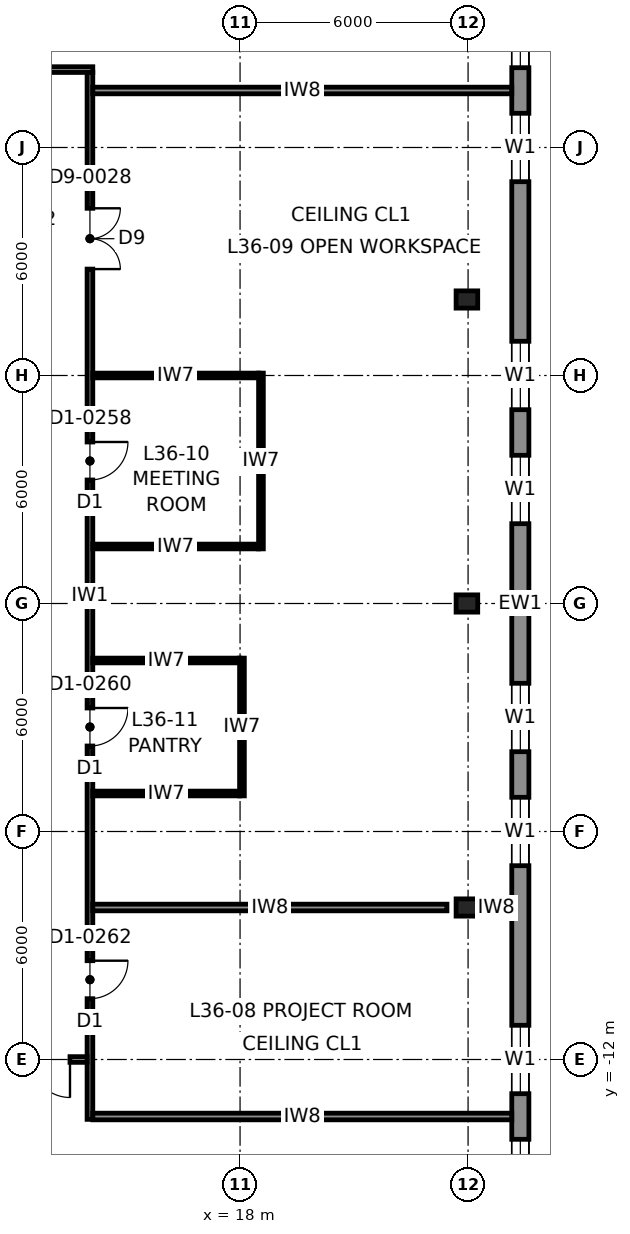
"""IFC4 building model, lengths in metres.
Left out: names, types, materials, properties, quantities, classifications, styles, units other than length and angle.
Written with IfcOpenShell. Run it as: python <this file> out.ifc"""

import sys

from ifc_helpers import new_model, si_unit, direction, frame, frame_2d, origin, origin_2d, place, context, subcontext, project, spatial, rectangle, i_section, extrude, element, fill, save


model = new_model("IFC4")
c1 = context("Model", 3, precision=1e-05, world=origin(), true_north=direction((0.0, 1.0)))
c2 = subcontext(c1, "Body", "Model", "MODEL_VIEW")
j1 = project(units=[si_unit("LENGTHUNIT", "METRE"), si_unit("PLANEANGLEUNIT", "RADIAN")], contexts=[c1])
p1 = place(None, origin())
s1 = spatial("IfcSite", under=j1, at=p1, CompositionType="ELEMENT")
p2 = place(p1, origin())
s2 = spatial("IfcBuilding", under=s1, at=p2, CompositionType="ELEMENT")
p3 = place(p2, frame((0.0, 0.0, 171.8)))
s3 = spatial("IfcBuildingStorey", under=s2, at=p3, CompositionType="ELEMENT", Elevation=171.8)
for number, where, z_axis, x_axis in (
    (1, (23.969, 0.0, 0.0), (-0.04, 0.0, 0.999), (0.0, -1.0, 0.0)),
    (2, (23.969, -8.0, 0.0), (-0.04, 0.0, 0.999), (0.0, -1.0, 0.0)),
    (3, (23.969, 8.0, 0.0), (-0.04, 0.0, 0.999), (0.0, -1.0, 0.0)),
):
    element("IfcColumn", number, at=place(p3, frame(where, z_axis=z_axis, x_axis=x_axis)), inside=s3, PredefinedType="COLUMN", context=c2, shape_type="SweptSolid", body=[
        extrude(i_section(OverallWidth=0.454, OverallDepth=0.569, WebThickness=0.078, FlangeThickness=0.125, at=origin_2d()), origin(), (0.0, 0.0, 1.0), 4.003),
    ])
p4 = place(p3, frame((25.375, -21.1, 0.0), z_axis=(0.0, 0.0, 1.0), x_axis=(0.0, 1.0, 0.0)))
e4 = element("IfcWall", 4, at=p4, inside=s3, PredefinedType="SOLIDWALL", context=c2, shape_type="SweptSolid", body=[
    extrude(rectangle(XDim=42.2, YDim=0.45, at=frame_2d((21.1, 0.0))), origin(), (0.0, 0.0, 1.0), 3.83),
])
p5 = place(p4, frame((5.2, 0.0, 0.7)))
e5 = element("IfcOpeningElement", 5, at=p5, cuts=e4, PredefinedType="OPENING", context=c2, shape_type="SweptSolid", body=[
    extrude(rectangle(XDim=1.8, YDim=2.6, at=frame_2d((0.9, 1.3))), frame((0.0, 0.235, 0.0), z_axis=(0.0, -1.0, 0.0), x_axis=(1.0, 0.0, 0.0)), (0.0, 0.0, 1.0), 0.47),
])
p6 = place(p4, frame((8.2, 0.0, 0.7)))
e6 = element("IfcOpeningElement", 6, at=p6, cuts=e4, PredefinedType="OPENING", context=c2, shape_type="SweptSolid", body=[
    extrude(rectangle(XDim=1.8, YDim=2.6, at=frame_2d((0.9, 1.3))), frame((0.0, 0.235, 0.0), z_axis=(0.0, -1.0, 0.0), x_axis=(1.0, 0.0, 0.0)), (0.0, 0.0, 1.0), 0.47),
])
p7 = place(p4, frame((14.2, 0.0, 0.7)))
e7 = element("IfcOpeningElement", 7, at=p7, cuts=e4, PredefinedType="OPENING", context=c2, shape_type="SweptSolid", body=[
    extrude(rectangle(XDim=1.8, YDim=2.6, at=frame_2d((0.9, 1.3))), frame((0.0, 0.235, 0.0), z_axis=(0.0, -1.0, 0.0), x_axis=(1.0, 0.0, 0.0)), (0.0, 0.0, 1.0), 0.47),
])
p8 = place(p4, frame((17.2, 0.0, 0.7)))
e8 = element("IfcOpeningElement", 8, at=p8, cuts=e4, PredefinedType="OPENING", context=c2, shape_type="SweptSolid", body=[
    extrude(rectangle(XDim=1.8, YDim=2.6, at=frame_2d((0.9, 1.3))), frame((0.0, 0.235, 0.0), z_axis=(0.0, -1.0, 0.0), x_axis=(1.0, 0.0, 0.0)), (0.0, 0.0, 1.0), 0.47),
])
p9 = place(p4, frame((23.2, 0.0, 0.7)))
e9 = element("IfcOpeningElement", 9, at=p9, cuts=e4, PredefinedType="OPENING", context=c2, shape_type="SweptSolid", body=[
    extrude(rectangle(XDim=1.8, YDim=2.6, at=frame_2d((0.9, 1.3))), frame((0.0, 0.235, 0.0), z_axis=(0.0, -1.0, 0.0), x_axis=(1.0, 0.0, 0.0)), (0.0, 0.0, 1.0), 0.47),
])
p10 = place(p4, frame((26.2, 0.0, 0.7)))
e10 = element("IfcOpeningElement", 10, at=p10, cuts=e4, PredefinedType="OPENING", context=c2, shape_type="SweptSolid", body=[
    extrude(rectangle(XDim=1.8, YDim=2.6, at=frame_2d((0.9, 1.3))), frame((0.0, 0.235, 0.0), z_axis=(0.0, -1.0, 0.0), x_axis=(1.0, 0.0, 0.0)), (0.0, 0.0, 1.0), 0.47),
])
p11 = place(p4, frame((32.2, 0.0, 0.7)))
e11 = element("IfcOpeningElement", 11, at=p11, cuts=e4, PredefinedType="OPENING", context=c2, shape_type="SweptSolid", body=[
    extrude(rectangle(XDim=1.8, YDim=2.6, at=frame_2d((0.9, 1.3))), frame((0.0, 0.235, 0.0), z_axis=(0.0, -1.0, 0.0), x_axis=(1.0, 0.0, 0.0)), (0.0, 0.0, 1.0), 0.47),
])
p12 = place(p4, frame((35.2, 0.0, 0.7)))
e12 = element("IfcOpeningElement", 12, at=p12, cuts=e4, PredefinedType="OPENING", context=c2, shape_type="SweptSolid", body=[
    extrude(rectangle(XDim=1.8, YDim=2.6, at=frame_2d((0.9, 1.3))), frame((0.0, 0.235, 0.0), z_axis=(0.0, -1.0, 0.0), x_axis=(1.0, 0.0, 0.0)), (0.0, 0.0, 1.0), 0.47),
])
p13 = place(p3, frame((-14.125, 14.05, 0.0), z_axis=(0.0, 0.0, 1.0), x_axis=(1.0, 0.0, 0.0)))
e13 = element("IfcWall", 13, at=p13, inside=s3, PredefinedType="PARTITIONING", context=c2, shape_type="SweptSolid", body=[
    extrude(rectangle(XDim=28.25, YDim=0.15, at=frame_2d((14.125, 0.0))), origin(), (0.0, 0.0, 1.0), 3.83),
])
p14 = place(p13, frame((2.425, 0.0, 0.0)))
e14 = element("IfcOpeningElement", 14, at=p14, cuts=e13, PredefinedType="OPENING", context=c2, shape_type="SweptSolid", body=[
    extrude(rectangle(XDim=1.6, YDim=2.3, at=frame_2d((0.8, 1.15))), frame((0.0, 0.085, 0.0), z_axis=(0.0, -1.0, 0.0), x_axis=(1.0, 0.0, 0.0)), (0.0, 0.0, 1.0), 0.17),
])
p15 = place(p13, frame((13.625, 0.0, 0.0)))
e15 = element("IfcOpeningElement", 15, at=p15, cuts=e13, PredefinedType="OPENING", context=c2, shape_type="SweptSolid", body=[
    extrude(rectangle(XDim=1.0, YDim=2.3, at=frame_2d((0.5, 1.15))), frame((0.0, 0.085, 0.0), z_axis=(0.0, -1.0, 0.0), x_axis=(1.0, 0.0, 0.0)), (0.0, 0.0, 1.0), 0.17),
])
p16 = place(p13, frame((24.225, 0.0, 0.0)))
e16 = element("IfcOpeningElement", 16, at=p16, cuts=e13, PredefinedType="OPENING", context=c2, shape_type="SweptSolid", body=[
    extrude(rectangle(XDim=1.6, YDim=2.3, at=frame_2d((0.8, 1.15))), frame((0.0, 0.085, 0.0), z_axis=(0.0, -1.0, 0.0), x_axis=(1.0, 0.0, 0.0)), (0.0, 0.0, 1.0), 0.17),
])
p17 = place(p13, frame((8.625, 0.0, 0.0)))
e17 = element("IfcOpeningElement", 17, at=p17, cuts=e13, PredefinedType="OPENING", context=c2, shape_type="SweptSolid", body=[
    extrude(rectangle(XDim=1.0, YDim=2.3, at=frame_2d((0.5, 1.15))), frame((0.0, 0.085, 0.0), z_axis=(0.0, -1.0, 0.0), x_axis=(1.0, 0.0, 0.0)), (0.0, 0.0, 1.0), 0.17),
])
p18 = place(p13, frame((18.625, 0.0, 0.0)))
e18 = element("IfcOpeningElement", 18, at=p18, cuts=e13, PredefinedType="OPENING", context=c2, shape_type="SweptSolid", body=[
    extrude(rectangle(XDim=1.0, YDim=2.3, at=frame_2d((0.5, 1.15))), frame((0.0, 0.085, 0.0), z_axis=(0.0, -1.0, 0.0), x_axis=(1.0, 0.0, 0.0)), (0.0, 0.0, 1.0), 0.17),
])
p19 = place(p3, frame((14.05, -13.575, 0.0), z_axis=(0.0, 0.0, 1.0), x_axis=(0.0, 1.0, 0.0)))
e19 = element("IfcWall", 19, at=p19, inside=s3, PredefinedType="PARTITIONING", context=c2, shape_type="SweptSolid", body=[
    extrude(rectangle(XDim=27.55, YDim=0.15, at=frame_2d((13.775, 0.0))), origin(), (0.0, 0.0, 1.0), 3.83),
])
p20 = place(p19, frame((3.175, 0.0, 0.0)))
e20 = element("IfcOpeningElement", 20, at=p20, cuts=e19, PredefinedType="OPENING", context=c2, shape_type="SweptSolid", body=[
    extrude(rectangle(XDim=1.0, YDim=2.3, at=frame_2d((0.5, 1.15))), frame((0.0, 0.085, 0.0), z_axis=(0.0, -1.0, 0.0), x_axis=(1.0, 0.0, 0.0)), (0.0, 0.0, 1.0), 0.17),
])
p21 = place(p19, frame((22.375, 0.0, 0.0)))
e21 = element("IfcOpeningElement", 21, at=p21, cuts=e19, PredefinedType="OPENING", context=c2, shape_type="SweptSolid", body=[
    extrude(rectangle(XDim=1.6, YDim=2.3, at=frame_2d((0.8, 1.15))), frame((0.0, 0.085, 0.0), z_axis=(0.0, -1.0, 0.0), x_axis=(1.0, 0.0, 0.0)), (0.0, 0.0, 1.0), 0.17),
])
p22 = place(p19, frame((16.825, 0.0, 0.0)))
e22 = element("IfcOpeningElement", 22, at=p22, cuts=e19, PredefinedType="OPENING", context=c2, shape_type="SweptSolid", body=[
    extrude(rectangle(XDim=1.0, YDim=2.3, at=frame_2d((0.5, 1.15))), frame((0.0, 0.085, 0.0), z_axis=(0.0, -1.0, 0.0), x_axis=(1.0, 0.0, 0.0)), (0.0, 0.0, 1.0), 0.17),
])
p23 = place(p19, frame((9.825, 0.0, 0.0)))
e23 = element("IfcOpeningElement", 23, at=p23, cuts=e19, PredefinedType="OPENING", context=c2, shape_type="SweptSolid", body=[
    extrude(rectangle(XDim=1.0, YDim=2.3, at=frame_2d((0.5, 1.15))), frame((0.0, 0.085, 0.0), z_axis=(0.0, -1.0, 0.0), x_axis=(1.0, 0.0, 0.0)), (0.0, 0.0, 1.0), 0.17),
])
p24 = place(p3, frame((13.975, -12.0, 0.0), z_axis=(0.0, 0.0, 1.0), x_axis=(-1.0, 0.0, 0.0)))
e24 = element("IfcWall", 24, at=p24, inside=s3, PredefinedType="PARTITIONING", context=c2, shape_type="SweptSolid", body=[
    extrude(rectangle(XDim=1.975, YDim=0.15, at=frame_2d((0.988, 0.0))), origin(), (0.0, 0.0, 1.0), 3.83),
])
p25 = place(p24, frame((0.45, 0.0, 0.0)))
e25 = element("IfcOpeningElement", 25, at=p25, cuts=e24, PredefinedType="OPENING", context=c2, shape_type="SweptSolid", body=[
    extrude(rectangle(XDim=1.0, YDim=2.3, at=frame_2d((0.5, 1.15))), frame((0.0, 0.085, 0.0), z_axis=(0.0, -1.0, 0.0), x_axis=(1.0, 0.0, 0.0)), (0.0, 0.0, 1.0), 0.17),
])
for number, where, z_axis, x_axis in (
    (26, (14.125, 13.5, 0.0), (0.0, 0.0, 1.0), (1.0, 0.0, 0.0)),
    (27, (25.15, -13.5, 0.0), (0.0, 0.0, 1.0), (-1.0, 0.0, 0.0)),
):
    element("IfcWall", number, at=place(p3, frame(where, z_axis=z_axis, x_axis=x_axis)), inside=s3, PredefinedType="PARTITIONING", context=c2, shape_type="SweptSolid", body=[
        extrude(rectangle(XDim=11.025, YDim=0.175, at=frame_2d((5.512, 0.0))), origin(), (0.0, 0.0, 1.0), 3.83),
    ])
p26 = place(p3, frame((14.125, -8.0, 0.0), z_axis=(0.0, 0.0, 1.0), x_axis=(1.0, 0.0, 0.0)))
e28 = element("IfcWall", 28, at=p26, inside=s3, PredefinedType="PARTITIONING", context=c2, shape_type="SweptSolid", body=[
    extrude(rectangle(XDim=9.319, YDim=0.175, at=frame_2d((4.66, 0.0))), origin(), (0.0, 0.0, 1.0), 2.84),
])
p27 = place(p3, frame((24.333, -8.0, 0.0), z_axis=(0.0, 0.0, 1.0), x_axis=(1.0, 0.0, 0.0)))
e29 = element("IfcWall", 29, at=p27, inside=s3, PredefinedType="PARTITIONING", context=c2, shape_type="SweptSolid", body=[
    extrude(rectangle(XDim=0.817, YDim=0.175, at=frame_2d((0.408, 0.0))), origin(), (0.0, 0.0, 1.0), 3.83),
])
p28 = place(p3, frame((18.55, 1.438, 0.0), z_axis=(0.0, 0.0, 1.0), x_axis=(0.0, 1.0, 0.0)))
e30 = element("IfcWall", 30, at=p28, inside=s3, PredefinedType="PARTITIONING", context=c2, shape_type="SweptSolid", body=[
    extrude(rectangle(XDim=4.625, YDim=0.125, at=frame_2d((2.312, 0.0))), origin(), (0.0, 0.0, 1.0), 3.83),
])
for number, where, z_axis, x_axis in (
    (31, (14.125, 1.5, 0.0), (0.0, 0.0, 1.0), (1.0, 0.0, 0.0)),
    (32, (14.125, 6.0, 0.0), (0.0, 0.0, 1.0), (1.0, 0.0, 0.0)),
):
    element("IfcWall", number, at=place(p3, frame(where, z_axis=z_axis, x_axis=x_axis)), inside=s3, PredefinedType="PARTITIONING", context=c2, shape_type="SweptSolid", body=[
        extrude(rectangle(XDim=4.363, YDim=0.125, at=frame_2d((2.181, 0.0))), origin(), (0.0, 0.0, 1.0), 3.83),
    ])
p29 = place(p3, frame((18.05, -5.062, 0.0), z_axis=(0.0, 0.0, 1.0), x_axis=(0.0, 1.0, 0.0)))
e33 = element("IfcWall", 33, at=p29, inside=s3, PredefinedType="PARTITIONING", context=c2, shape_type="SweptSolid", body=[
    extrude(rectangle(XDim=3.625, YDim=0.125, at=frame_2d((1.812, 0.0))), origin(), (0.0, 0.0, 1.0), 3.83),
])
for number, where, z_axis, x_axis in (
    (34, (14.125, -5.0, 0.0), (0.0, 0.0, 1.0), (1.0, 0.0, 0.0)),
    (35, (14.125, -1.5, 0.0), (0.0, 0.0, 1.0), (1.0, 0.0, 0.0)),
):
    element("IfcWall", number, at=place(p3, frame(where, z_axis=z_axis, x_axis=x_axis)), inside=s3, PredefinedType="PARTITIONING", context=c2, shape_type="SweptSolid", body=[
        extrude(rectangle(XDim=3.863, YDim=0.125, at=frame_2d((1.931, 0.0))), origin(), (0.0, 0.0, 1.0), 3.83),
    ])
p30 = place(p5, origin())
e36 = element("IfcWindow", 36, at=p30, inside=s3, PartitioningType="SINGLE_PANEL", PredefinedType="WINDOW", context=c2, shape_type="SweptSolid", body=[
    extrude(rectangle(XDim=1.8, YDim=2.6, at=frame_2d((0.9, 1.3))), frame((0.0, 0.03, 0.0), z_axis=(0.0, -1.0, 0.0), x_axis=(1.0, 0.0, 0.0)), (0.0, 0.0, 1.0), 0.06),
])
fill(e5, e36)
p31 = place(p6, origin())
e37 = element("IfcWindow", 37, at=p31, inside=s3, PartitioningType="SINGLE_PANEL", PredefinedType="WINDOW", context=c2, shape_type="SweptSolid", body=[
    extrude(rectangle(XDim=1.8, YDim=2.6, at=frame_2d((0.9, 1.3))), frame((0.0, 0.03, 0.0), z_axis=(0.0, -1.0, 0.0), x_axis=(1.0, 0.0, 0.0)), (0.0, 0.0, 1.0), 0.06),
])
fill(e6, e37)
p32 = place(p7, origin())
e38 = element("IfcWindow", 38, at=p32, inside=s3, PartitioningType="SINGLE_PANEL", PredefinedType="WINDOW", context=c2, shape_type="SweptSolid", body=[
    extrude(rectangle(XDim=1.8, YDim=2.6, at=frame_2d((0.9, 1.3))), frame((0.0, 0.03, 0.0), z_axis=(0.0, -1.0, 0.0), x_axis=(1.0, 0.0, 0.0)), (0.0, 0.0, 1.0), 0.06),
])
fill(e7, e38)
p33 = place(p8, origin())
e39 = element("IfcWindow", 39, at=p33, inside=s3, PartitioningType="SINGLE_PANEL", PredefinedType="WINDOW", context=c2, shape_type="SweptSolid", body=[
    extrude(rectangle(XDim=1.8, YDim=2.6, at=frame_2d((0.9, 1.3))), frame((0.0, 0.03, 0.0), z_axis=(0.0, -1.0, 0.0), x_axis=(1.0, 0.0, 0.0)), (0.0, 0.0, 1.0), 0.06),
])
fill(e8, e39)
p34 = place(p9, origin())
e40 = element("IfcWindow", 40, at=p34, inside=s3, PartitioningType="SINGLE_PANEL", PredefinedType="WINDOW", context=c2, shape_type="SweptSolid", body=[
    extrude(rectangle(XDim=1.8, YDim=2.6, at=frame_2d((0.9, 1.3))), frame((0.0, 0.03, 0.0), z_axis=(0.0, -1.0, 0.0), x_axis=(1.0, 0.0, 0.0)), (0.0, 0.0, 1.0), 0.06),
])
fill(e9, e40)
p35 = place(p10, origin())
e41 = element("IfcWindow", 41, at=p35, inside=s3, PartitioningType="SINGLE_PANEL", PredefinedType="WINDOW", context=c2, shape_type="SweptSolid", body=[
    extrude(rectangle(XDim=1.8, YDim=2.6, at=frame_2d((0.9, 1.3))), frame((0.0, 0.03, 0.0), z_axis=(0.0, -1.0, 0.0), x_axis=(1.0, 0.0, 0.0)), (0.0, 0.0, 1.0), 0.06),
])
fill(e10, e41)
p36 = place(p11, origin())
e42 = element("IfcWindow", 42, at=p36, inside=s3, PartitioningType="SINGLE_PANEL", PredefinedType="WINDOW", context=c2, shape_type="SweptSolid", body=[
    extrude(rectangle(XDim=1.8, YDim=2.6, at=frame_2d((0.9, 1.3))), frame((0.0, 0.03, 0.0), z_axis=(0.0, -1.0, 0.0), x_axis=(1.0, 0.0, 0.0)), (0.0, 0.0, 1.0), 0.06),
])
fill(e11, e42)
p37 = place(p12, origin())
e43 = element("IfcWindow", 43, at=p37, inside=s3, PartitioningType="SINGLE_PANEL", PredefinedType="WINDOW", context=c2, shape_type="SweptSolid", body=[
    extrude(rectangle(XDim=1.8, YDim=2.6, at=frame_2d((0.9, 1.3))), frame((0.0, 0.03, 0.0), z_axis=(0.0, -1.0, 0.0), x_axis=(1.0, 0.0, 0.0)), (0.0, 0.0, 1.0), 0.06),
])
fill(e12, e43)
p38 = place(p25, origin())
e44 = element("IfcDoor", 44, at=p38, inside=s3, OperationType="SINGLE_SWING_LEFT", PredefinedType="DOOR", context=c2, shape_type="SweptSolid", body=[
    extrude(rectangle(XDim=1.0, YDim=2.3, at=frame_2d((0.5, 1.15))), frame((0.0, 0.025, 0.0), z_axis=(0.0, -1.0, 0.0), x_axis=(1.0, 0.0, 0.0)), (0.0, 0.0, 1.0), 0.05),
])
fill(e25, e44)
p39 = place(p20, frame((1.0, 0.0, 0.0), z_axis=(0.0, 0.0, 1.0), x_axis=(-1.0, 0.0, 0.0)))
e45 = element("IfcDoor", 45, at=p39, inside=s3, OperationType="SINGLE_SWING_LEFT", PredefinedType="DOOR", context=c2, shape_type="SweptSolid", body=[
    extrude(rectangle(XDim=1.0, YDim=2.3, at=frame_2d((0.5, 1.15))), frame((0.0, 0.025, 0.0), z_axis=(0.0, -1.0, 0.0), x_axis=(1.0, 0.0, 0.0)), (0.0, 0.0, 1.0), 0.05),
])
fill(e20, e45)
p40 = place(p21, frame((1.6, 0.0, 0.0), z_axis=(0.0, 0.0, 1.0), x_axis=(-1.0, 0.0, 0.0)))
e46 = element("IfcDoor", 46, at=p40, inside=s3, OperationType="DOUBLE_DOOR_SINGLE_SWING", PredefinedType="DOOR", context=c2, shape_type="SweptSolid", body=[
    extrude(rectangle(XDim=1.6, YDim=2.3, at=frame_2d((0.8, 1.15))), frame((0.0, 0.025, 0.0), z_axis=(0.0, -1.0, 0.0), x_axis=(1.0, 0.0, 0.0)), (0.0, 0.0, 1.0), 0.05),
])
fill(e21, e46)
p41 = place(p22, frame((1.0, 0.0, 0.0), z_axis=(0.0, 0.0, 1.0), x_axis=(-1.0, 0.0, 0.0)))
e47 = element("IfcDoor", 47, at=p41, inside=s3, OperationType="SINGLE_SWING_LEFT", PredefinedType="DOOR", context=c2, shape_type="SweptSolid", body=[
    extrude(rectangle(XDim=1.0, YDim=2.3, at=frame_2d((0.5, 1.15))), frame((0.0, 0.025, 0.0), z_axis=(0.0, -1.0, 0.0), x_axis=(1.0, 0.0, 0.0)), (0.0, 0.0, 1.0), 0.05),
])
fill(e22, e47)
p42 = place(p23, frame((1.0, 0.0, 0.0), z_axis=(0.0, 0.0, 1.0), x_axis=(-1.0, 0.0, 0.0)))
e48 = element("IfcDoor", 48, at=p42, inside=s3, OperationType="SINGLE_SWING_LEFT", PredefinedType="DOOR", context=c2, shape_type="SweptSolid", body=[
    extrude(rectangle(XDim=1.0, YDim=2.3, at=frame_2d((0.5, 1.15))), frame((0.0, 0.025, 0.0), z_axis=(0.0, -1.0, 0.0), x_axis=(1.0, 0.0, 0.0)), (0.0, 0.0, 1.0), 0.05),
])
fill(e23, e48)
save(model, sys.argv[1])
